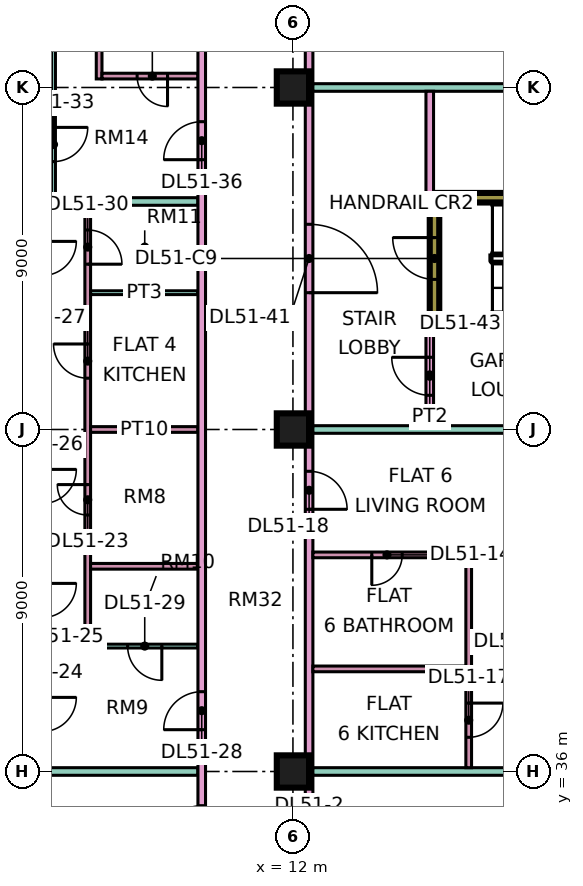
"""IFC4 building model, lengths in metres.
Left out: names, types, materials, properties, quantities, classifications, styles, units other than length and angle.
Written with IfcOpenShell. Run it as: python <this file> out.ifc"""

import sys

from ifc_helpers import new_model, si_unit, direction, frame, frame_2d, origin, origin_2d, place, context, subcontext, project, spatial, rectangle, extrude, element, fill, save


model = new_model("IFC4")
c1 = context("Model", 3, precision=1e-05, world=origin(), true_north=direction((0.0, 1.0)))
c2 = subcontext(c1, "Body", "Model", "MODEL_VIEW")
j1 = project(units=[si_unit("LENGTHUNIT", "METRE"), si_unit("PLANEANGLEUNIT", "RADIAN")], contexts=[c1])
p1 = place(None, origin())
s1 = spatial("IfcSite", under=j1, at=p1, CompositionType="ELEMENT")
p2 = place(p1, origin())
s2 = spatial("IfcBuilding", under=s1, at=p2, CompositionType="ELEMENT")
p3 = place(p2, frame((0.0, 0.0, 219.15)))
s3 = spatial("IfcBuildingStorey", under=s2, at=p3, CompositionType="ELEMENT", Elevation=219.15)
for number, where, z_axis, x_axis in (
    (1, (12.0, 36.0, 0.0), (0.0, 0.0, 1.0), (1.0, 0.0, 0.0)),
    (2, (12.0, 45.0, 0.0), (0.0, 0.0, 1.0), (1.0, 0.0, 0.0)),
    (3, (12.0, 54.0, 0.0), (0.0, 0.0, 1.0), (1.0, 0.0, 0.0)),
):
    element("IfcColumn", number, at=place(p3, frame(where, z_axis=z_axis, x_axis=x_axis)), inside=s3, PredefinedType="COLUMN", context=c2, shape_type="SweptSolid", body=[
        extrude(rectangle(XDim=0.85, YDim=0.85, at=origin_2d()), origin(), (0.0, 0.0, 1.0), 3.75),
    ])
for number, where, z_axis, x_axis in (
    (4, (15.6, 47.9, 0.0), (0.0, 0.0, 1.0), (1.0, 0.0, 0.0)),
    (5, (15.6, 51.1, 0.0), (0.0, 0.0, 1.0), (1.0, 0.0, 0.0)),
):
    element("IfcWall", number, at=place(p3, frame(where, z_axis=z_axis, x_axis=x_axis)), inside=s3, PredefinedType="SHEAR", context=c2, shape_type="SweptSolid", body=[
        extrude(rectangle(XDim=7.0, YDim=0.25, at=frame_2d((3.5, 0.0))), origin(), (0.0, 0.0, 1.0), 3.75),
    ])
p4 = place(p3, frame((15.725, 48.025, 0.0), z_axis=(0.0, 0.0, 1.0), x_axis=(0.0, 1.0, 0.0)))
e6 = element("IfcWall", 6, at=p4, inside=s3, PredefinedType="SHEAR", context=c2, shape_type="SweptSolid", body=[
    extrude(rectangle(XDim=2.95, YDim=0.25, at=frame_2d((1.475, 0.0))), origin(), (0.0, 0.0, 1.0), 3.75),
])
p5 = place(p4, frame((0.925, 0.0, 0.0)))
e7 = element("IfcOpeningElement", 7, at=p5, cuts=e6, PredefinedType="OPENING", context=c2, shape_type="SweptSolid", body=[
    extrude(rectangle(XDim=1.1, YDim=2.2, at=frame_2d((0.55, 1.1))), frame((0.0, 0.135, 0.0), z_axis=(0.0, -1.0, 0.0), x_axis=(1.0, 0.0, 0.0)), (0.0, 0.0, 1.0), 0.27),
])
p6 = place(p3, frame((0.0, 36.0, 0.0), z_axis=(0.0, 0.0, 1.0), x_axis=(1.0, 0.0, 0.0)))
e8 = element("IfcWall", 8, at=p6, inside=s3, PredefinedType="PARTITIONING", context=c2, shape_type="SweptSolid", body=[
    extrude(rectangle(XDim=9.5, YDim=0.2, at=frame_2d((4.75, 0.0))), origin(), (0.0, 0.0, 1.0), 3.35),
])
p7 = place(p3, frame((5.65, 51.0, 0.0), z_axis=(0.0, 0.0, 1.0), x_axis=(1.0, 0.0, 0.0)))
e9 = element("IfcWall", 9, at=p7, inside=s3, PredefinedType="PARTITIONING", context=c2, shape_type="SweptSolid", body=[
    extrude(rectangle(XDim=3.85, YDim=0.2, at=frame_2d((1.925, 0.0))), origin(), (0.0, 0.0, 1.0), 3.35),
])
p8 = place(p3, frame((5.7, 51.1, 0.0), z_axis=(0.0, 0.0, 1.0), x_axis=(0.0, 1.0, 0.0)))
e10 = element("IfcWall", 10, at=p8, inside=s3, PredefinedType="PARTITIONING", context=c2, shape_type="SweptSolid", body=[
    extrude(rectangle(XDim=8.95, YDim=0.1, at=frame_2d((4.475, 0.0))), origin(), (0.0, 0.0, 1.0), 3.35),
])
p9 = place(p8, frame((0.95, 0.0, 0.0)))
e11 = element("IfcOpeningElement", 11, at=p9, cuts=e10, PredefinedType="OPENING", context=c2, shape_type="SweptSolid", body=[
    extrude(rectangle(XDim=0.9, YDim=2.1, at=frame_2d((0.45, 1.05))), frame((0.0, 0.06, 0.0), z_axis=(0.0, -1.0, 0.0), x_axis=(1.0, 0.0, 0.0)), (0.0, 0.0, 1.0), 0.12),
])
p10 = place(p8, frame((3.95, 0.0, 0.0)))
e12 = element("IfcOpeningElement", 12, at=p10, cuts=e10, PredefinedType="OPENING", context=c2, shape_type="SweptSolid", body=[
    extrude(rectangle(XDim=0.9, YDim=2.1, at=frame_2d((0.45, 1.05))), frame((0.0, 0.06, 0.0), z_axis=(0.0, -1.0, 0.0), x_axis=(1.0, 0.0, 0.0)), (0.0, 0.0, 1.0), 0.12),
])
p11 = place(p8, frame((6.95, 0.0, 0.0)))
e13 = element("IfcOpeningElement", 13, at=p11, cuts=e10, PredefinedType="OPENING", context=c2, shape_type="SweptSolid", body=[
    extrude(rectangle(XDim=0.9, YDim=2.1, at=frame_2d((0.45, 1.05))), frame((0.0, 0.06, 0.0), z_axis=(0.0, -1.0, 0.0), x_axis=(1.0, 0.0, 0.0)), (0.0, 0.0, 1.0), 0.12),
])
p12 = place(p3, frame((6.6, 39.25, 0.0), z_axis=(0.0, 0.0, 1.0), x_axis=(0.0, 1.0, 0.0)))
e14 = element("IfcWall", 14, at=p12, inside=s3, PredefinedType="PARTITIONING", context=c2, shape_type="SweptSolid", body=[
    extrude(rectangle(XDim=11.65, YDim=0.15, at=frame_2d((5.825, 0.0))), origin(), (0.0, 0.0, 1.0), 3.35),
])
p13 = place(p12, frame((3.5, 0.0, 0.0)))
e15 = element("IfcOpeningElement", 15, at=p13, cuts=e14, PredefinedType="OPENING", context=c2, shape_type="SweptSolid", body=[
    extrude(rectangle(XDim=0.8, YDim=2.1, at=frame_2d((0.4, 1.05))), frame((0.0, 0.085, 0.0), z_axis=(0.0, -1.0, 0.0), x_axis=(1.0, 0.0, 0.0)), (0.0, 0.0, 1.0), 0.17),
])
p14 = place(p12, frame((7.1, 0.0, 0.0)))
e16 = element("IfcOpeningElement", 16, at=p14, cuts=e14, PredefinedType="OPENING", context=c2, shape_type="SweptSolid", body=[
    extrude(rectangle(XDim=0.9, YDim=2.1, at=frame_2d((0.45, 1.05))), frame((0.0, 0.085, 0.0), z_axis=(0.0, -1.0, 0.0), x_axis=(1.0, 0.0, 0.0)), (0.0, 0.0, 1.0), 0.17),
])
p15 = place(p12, frame((10.1, 0.0, 0.0)))
e17 = element("IfcOpeningElement", 17, at=p15, cuts=e14, PredefinedType="OPENING", context=c2, shape_type="SweptSolid", body=[
    extrude(rectangle(XDim=0.9, YDim=2.1, at=frame_2d((0.45, 1.05))), frame((0.0, 0.085, 0.0), z_axis=(0.0, -1.0, 0.0), x_axis=(1.0, 0.0, 0.0)), (0.0, 0.0, 1.0), 0.17),
])
p16 = place(p3, frame((6.675, 39.3, 0.0), z_axis=(0.0, 0.0, 1.0), x_axis=(1.0, 0.0, 0.0)))
e18 = element("IfcWall", 18, at=p16, inside=s3, PredefinedType="PARTITIONING", context=c2, shape_type="SweptSolid", body=[
    extrude(rectangle(XDim=2.825, YDim=0.1, at=frame_2d((1.413, 0.0))), origin(), (0.0, 0.0, 1.0), 3.35),
])
p17 = place(p16, frame((0.975, 0.0, 0.0)))
e19 = element("IfcOpeningElement", 19, at=p17, cuts=e18, PredefinedType="OPENING", context=c2, shape_type="SweptSolid", body=[
    extrude(rectangle(XDim=0.9, YDim=2.1, at=frame_2d((0.45, 1.05))), frame((0.0, 0.06, 0.0), z_axis=(0.0, -1.0, 0.0), x_axis=(1.0, 0.0, 0.0)), (0.0, 0.0, 1.0), 0.12),
])
for number, where, z_axis, x_axis in (
    (20, (6.675, 41.4, 0.0), (0.0, 0.0, 1.0), (1.0, 0.0, 0.0)),
    (21, (6.675, 45.0, 0.0), (0.0, 0.0, 1.0), (1.0, 0.0, 0.0)),
):
    element("IfcWall", number, at=place(p3, frame(where, z_axis=z_axis, x_axis=x_axis)), inside=s3, PredefinedType="PARTITIONING", context=c2, shape_type="SweptSolid", body=[
        extrude(rectangle(XDim=2.825, YDim=0.15, at=frame_2d((1.413, 0.0))), origin(), (0.0, 0.0, 1.0), 3.35),
    ])
p18 = place(p3, frame((6.675, 48.6, 0.0), z_axis=(0.0, 0.0, 1.0), x_axis=(1.0, 0.0, 0.0)))
e22 = element("IfcWall", 22, at=p18, inside=s3, PredefinedType="PARTITIONING", context=c2, shape_type="SweptSolid", body=[
    extrude(rectangle(XDim=2.825, YDim=0.1, at=frame_2d((1.413, 0.0))), origin(), (0.0, 0.0, 1.0), 3.35),
])
p19 = place(p3, frame((6.9, 54.225, 0.0), z_axis=(0.0, 0.0, 1.0), x_axis=(0.0, 1.0, 0.0)))
e23 = element("IfcWall", 23, at=p19, inside=s3, PredefinedType="PARTITIONING", context=c2, shape_type="SweptSolid", body=[
    extrude(rectangle(XDim=8.701, YDim=0.15, at=frame_2d((4.351, 0.0))), origin(), (0.0, 0.0, 1.0), 3.35),
])
p20 = place(p19, frame((5.025, 0.0, 0.0)))
e24 = element("IfcOpeningElement", 24, at=p20, cuts=e23, PredefinedType="OPENING", context=c2, shape_type="SweptSolid", body=[
    extrude(rectangle(XDim=0.9, YDim=2.1, at=frame_2d((0.45, 1.05))), frame((0.0, 0.085, 0.0), z_axis=(0.0, -1.0, 0.0), x_axis=(1.0, 0.0, 0.0)), (0.0, 0.0, 1.0), 0.17),
])
p21 = place(p3, frame((6.975, 54.3, 0.0), z_axis=(0.0, 0.0, 1.0), x_axis=(1.0, 0.0, 0.0)))
e25 = element("IfcWall", 25, at=p21, inside=s3, PredefinedType="PARTITIONING", context=c2, shape_type="SweptSolid", body=[
    extrude(rectangle(XDim=2.525, YDim=0.15, at=frame_2d((1.262, 0.0))), origin(), (0.0, 0.0, 1.0), 3.35),
])
p22 = place(p21, frame((0.925, 0.0, 0.0)))
e26 = element("IfcOpeningElement", 26, at=p22, cuts=e25, PredefinedType="OPENING", context=c2, shape_type="SweptSolid", body=[
    extrude(rectangle(XDim=0.8, YDim=2.1, at=frame_2d((0.4, 1.05))), frame((0.0, 0.085, 0.0), z_axis=(0.0, -1.0, 0.0), x_axis=(1.0, 0.0, 0.0)), (0.0, 0.0, 1.0), 0.17),
])
p23 = place(p3, frame((9.6, 20.0, 0.0), z_axis=(0.0, 0.0, 1.0), x_axis=(0.0, 1.0, 0.0)))
e27 = element("IfcWall", 27, at=p23, inside=s3, PredefinedType="PARTITIONING", context=c2, shape_type="SweptSolid", body=[
    extrude(rectangle(XDim=42.926, YDim=0.2, at=frame_2d((21.463, 0.0))), origin(), (0.0, 0.0, 1.0), 3.35),
])
p24 = place(p23, frame((17.1, 0.0, 0.0)))
e28 = element("IfcOpeningElement", 28, at=p24, cuts=e27, PredefinedType="OPENING", context=c2, shape_type="SweptSolid", body=[
    extrude(rectangle(XDim=1.0, YDim=2.1, at=frame_2d((0.5, 1.05))), frame((0.0, 0.11, 0.0), z_axis=(0.0, -1.0, 0.0), x_axis=(1.0, 0.0, 0.0)), (0.0, 0.0, 1.0), 0.22),
])
p25 = place(p23, frame((32.1, 0.0, 0.0)))
e29 = element("IfcOpeningElement", 29, at=p25, cuts=e27, PredefinedType="OPENING", context=c2, shape_type="SweptSolid", body=[
    extrude(rectangle(XDim=1.0, YDim=2.1, at=frame_2d((0.5, 1.05))), frame((0.0, 0.11, 0.0), z_axis=(0.0, -1.0, 0.0), x_axis=(1.0, 0.0, 0.0)), (0.0, 0.0, 1.0), 0.22),
])
p26 = place(p23, frame((0.6, 0.0, 0.0)))
e30 = element("IfcOpeningElement", 30, at=p26, cuts=e27, PredefinedType="OPENING", context=c2, shape_type="SweptSolid", body=[
    extrude(rectangle(XDim=1.2, YDim=2.1, at=frame_2d((0.6, 1.05))), frame((0.0, 0.11, 0.0), z_axis=(0.0, -1.0, 0.0), x_axis=(1.0, 0.0, 0.0)), (0.0, 0.0, 1.0), 0.22),
])
p27 = place(p23, frame((14.1, 0.0, 0.0)))
e31 = element("IfcOpeningElement", 31, at=p27, cuts=e27, PredefinedType="OPENING", context=c2, shape_type="SweptSolid", body=[
    extrude(rectangle(XDim=1.0, YDim=2.1, at=frame_2d((0.5, 1.05))), frame((0.0, 0.11, 0.0), z_axis=(0.0, -1.0, 0.0), x_axis=(1.0, 0.0, 0.0)), (0.0, 0.0, 1.0), 0.22),
])
p28 = place(p3, frame((12.425, 20.0, 0.0), z_axis=(0.0, 0.0, 1.0), x_axis=(0.0, 1.0, 0.0)))
e32 = element("IfcWall", 32, at=p28, inside=s3, PredefinedType="PARTITIONING", context=c2, shape_type="SweptSolid", body=[
    extrude(rectangle(XDim=43.0, YDim=0.2, at=frame_2d((21.5, 0.0))), origin(), (0.0, 0.0, 1.0), 3.35),
])
p29 = place(p28, frame((7.15, 0.0, 0.0)))
e33 = element("IfcOpeningElement", 33, at=p29, cuts=e32, PredefinedType="OPENING", context=c2, shape_type="SweptSolid", body=[
    extrude(rectangle(XDim=1.6, YDim=2.1, at=frame_2d((0.8, 1.05))), frame((0.0, 0.11, 0.0), z_axis=(0.0, -1.0, 0.0), x_axis=(1.0, 0.0, 0.0)), (0.0, 0.0, 1.0), 0.22),
])
p30 = place(p28, frame((13.5, 0.0, 0.0)))
e34 = element("IfcOpeningElement", 34, at=p30, cuts=e32, PredefinedType="OPENING", context=c2, shape_type="SweptSolid", body=[
    extrude(rectangle(XDim=1.0, YDim=2.1, at=frame_2d((0.5, 1.05))), frame((0.0, 0.11, 0.0), z_axis=(0.0, -1.0, 0.0), x_axis=(1.0, 0.0, 0.0)), (0.0, 0.0, 1.0), 0.22),
])
p31 = place(p28, frame((22.9, 0.0, 0.0)))
e35 = element("IfcOpeningElement", 35, at=p31, cuts=e32, PredefinedType="OPENING", context=c2, shape_type="SweptSolid", body=[
    extrude(rectangle(XDim=1.0, YDim=2.1, at=frame_2d((0.5, 1.05))), frame((0.0, 0.11, 0.0), z_axis=(0.0, -1.0, 0.0), x_axis=(1.0, 0.0, 0.0)), (0.0, 0.0, 1.0), 0.22),
])
p32 = place(p28, frame((35.35, 0.0, 0.0)))
e36 = element("IfcOpeningElement", 36, at=p32, cuts=e32, PredefinedType="OPENING", context=c2, shape_type="SweptSolid", body=[
    extrude(rectangle(XDim=1.0, YDim=2.1, at=frame_2d((0.5, 1.05))), frame((0.0, 0.11, 0.0), z_axis=(0.0, -1.0, 0.0), x_axis=(1.0, 0.0, 0.0)), (0.0, 0.0, 1.0), 0.22),
])
p33 = place(p28, frame((1.15, 0.0, 0.0)))
e37 = element("IfcOpeningElement", 37, at=p33, cuts=e32, PredefinedType="OPENING", context=c2, shape_type="SweptSolid", body=[
    extrude(rectangle(XDim=1.8, YDim=2.1, at=frame_2d((0.9, 1.05))), frame((0.0, 0.11, 0.0), z_axis=(0.0, -1.0, 0.0), x_axis=(1.0, 0.0, 0.0)), (0.0, 0.0, 1.0), 0.22),
])
p34 = place(p28, frame((28.6, 0.0, 0.0)))
e38 = element("IfcOpeningElement", 38, at=p34, cuts=e32, PredefinedType="OPENING", context=c2, shape_type="SweptSolid", body=[
    extrude(rectangle(XDim=1.8, YDim=2.1, at=frame_2d((0.9, 1.05))), frame((0.0, 0.11, 0.0), z_axis=(0.0, -1.0, 0.0), x_axis=(1.0, 0.0, 0.0)), (0.0, 0.0, 1.0), 0.22),
])
p35 = place(p3, frame((12.525, 36.0, 0.0), z_axis=(0.0, 0.0, 1.0), x_axis=(1.0, 0.0, 0.0)))
e39 = element("IfcWall", 39, at=p35, inside=s3, PredefinedType="PARTITIONING", context=c2, shape_type="SweptSolid", body=[
    extrude(rectangle(XDim=11.475, YDim=0.2, at=frame_2d((5.738, 0.0))), origin(), (0.0, 0.0, 1.0), 3.35),
])
p36 = place(p3, frame((12.525, 38.7, 0.0), z_axis=(0.0, 0.0, 1.0), x_axis=(1.0, 0.0, 0.0)))
e40 = element("IfcWall", 40, at=p36, inside=s3, PredefinedType="PARTITIONING", context=c2, shape_type="SweptSolid", body=[
    extrude(rectangle(XDim=4.025, YDim=0.15, at=frame_2d((2.013, 0.0))), origin(), (0.0, 0.0, 1.0), 3.35),
])
p37 = place(p3, frame((12.525, 41.7, 0.0), z_axis=(0.0, 0.0, 1.0), x_axis=(1.0, 0.0, 0.0)))
e41 = element("IfcWall", 41, at=p37, inside=s3, PredefinedType="PARTITIONING", context=c2, shape_type="SweptSolid", body=[
    extrude(rectangle(XDim=4.025, YDim=0.15, at=frame_2d((2.013, 0.0))), origin(), (0.0, 0.0, 1.0), 3.35),
])
p38 = place(p37, frame((1.55, 0.0, 0.0)))
e42 = element("IfcOpeningElement", 42, at=p38, cuts=e41, PredefinedType="OPENING", context=c2, shape_type="SweptSolid", body=[
    extrude(rectangle(XDim=0.8, YDim=2.1, at=frame_2d((0.4, 1.05))), frame((0.0, 0.085, 0.0), z_axis=(0.0, -1.0, 0.0), x_axis=(1.0, 0.0, 0.0)), (0.0, 0.0, 1.0), 0.17),
])
p39 = place(p3, frame((12.525, 45.0, 0.0), z_axis=(0.0, 0.0, 1.0), x_axis=(1.0, 0.0, 0.0)))
e43 = element("IfcWall", 43, at=p39, inside=s3, PredefinedType="PARTITIONING", context=c2, shape_type="SweptSolid", body=[
    extrude(rectangle(XDim=11.475, YDim=0.2, at=frame_2d((5.738, 0.0))), origin(), (0.0, 0.0, 1.0), 3.35),
])
p40 = place(p3, frame((12.525, 54.0, 0.0), z_axis=(0.0, 0.0, 1.0), x_axis=(1.0, 0.0, 0.0)))
e44 = element("IfcWall", 44, at=p40, inside=s3, PredefinedType="PARTITIONING", context=c2, shape_type="SweptSolid", body=[
    extrude(rectangle(XDim=11.401, YDim=0.2, at=frame_2d((5.701, 0.0))), origin(), (0.0, 0.0, 1.0), 3.35),
])
p41 = place(p3, frame((15.6, 45.1, 0.0), z_axis=(0.0, 0.0, 1.0), x_axis=(0.0, 1.0, 0.0)))
e45 = element("IfcWall", 45, at=p41, inside=s3, PredefinedType="PARTITIONING", context=c2, shape_type="SweptSolid", body=[
    extrude(rectangle(XDim=2.675, YDim=0.2, at=frame_2d((1.337, 0.0))), origin(), (0.0, 0.0, 1.0), 3.35),
])
p42 = place(p41, frame((0.8, 0.0, 0.0)))
e46 = element("IfcOpeningElement", 46, at=p42, cuts=e45, PredefinedType="OPENING", context=c2, shape_type="SweptSolid", body=[
    extrude(rectangle(XDim=1.0, YDim=2.1, at=frame_2d((0.5, 1.05))), frame((0.0, 0.11, 0.0), z_axis=(0.0, -1.0, 0.0), x_axis=(1.0, 0.0, 0.0)), (0.0, 0.0, 1.0), 0.22),
])
p43 = place(p3, frame((15.6, 51.225, 0.0), z_axis=(0.0, 0.0, 1.0), x_axis=(0.0, 1.0, 0.0)))
e47 = element("IfcWall", 47, at=p43, inside=s3, PredefinedType="PARTITIONING", context=c2, shape_type="SweptSolid", body=[
    extrude(rectangle(XDim=2.675, YDim=0.2, at=frame_2d((1.337, 0.0))), origin(), (0.0, 0.0, 1.0), 3.35),
])
p44 = place(p3, frame((16.625, 36.1, 0.0), z_axis=(0.0, 0.0, 1.0), x_axis=(0.0, 1.0, 0.0)))
e48 = element("IfcWall", 48, at=p44, inside=s3, PredefinedType="PARTITIONING", context=c2, shape_type="SweptSolid", body=[
    extrude(rectangle(XDim=5.675, YDim=0.15, at=frame_2d((2.837, 0.0))), origin(), (0.0, 0.0, 1.0), 3.35),
])
p45 = place(p44, frame((0.8, 0.0, 0.0)))
e49 = element("IfcOpeningElement", 49, at=p45, cuts=e48, PredefinedType="OPENING", context=c2, shape_type="SweptSolid", body=[
    extrude(rectangle(XDim=0.9, YDim=2.1, at=frame_2d((0.45, 1.05))), frame((0.0, 0.085, 0.0), z_axis=(0.0, -1.0, 0.0), x_axis=(1.0, 0.0, 0.0)), (0.0, 0.0, 1.0), 0.17),
])
p46 = place(p5, frame((1.1, 0.0, 0.0), z_axis=(0.0, 0.0, 1.0), x_axis=(-1.0, 0.0, 0.0)))
e50 = element("IfcDoor", 50, at=p46, inside=s3, OperationType="SINGLE_SWING_RIGHT", PredefinedType="DOOR", context=c2, shape_type="SweptSolid", body=[
    extrude(rectangle(XDim=1.1, YDim=2.2, at=frame_2d((0.55, 1.1))), frame((0.0, 0.025, 0.0), z_axis=(0.0, -1.0, 0.0), x_axis=(1.0, 0.0, 0.0)), (0.0, 0.0, 1.0), 0.05),
])
fill(e7, e50)
p47 = place(p38, frame((0.8, 0.0, 0.0), z_axis=(0.0, 0.0, 1.0), x_axis=(-1.0, 0.0, 0.0)))
e51 = element("IfcDoor", 51, at=p47, inside=s3, OperationType="SINGLE_SWING_LEFT", PredefinedType="DOOR", context=c2, shape_type="SweptSolid", body=[
    extrude(rectangle(XDim=0.8, YDim=2.1, at=frame_2d((0.4, 1.05))), frame((0.0, 0.025, 0.0), z_axis=(0.0, -1.0, 0.0), x_axis=(1.0, 0.0, 0.0)), (0.0, 0.0, 1.0), 0.05),
])
fill(e42, e51)
p48 = place(p45, origin())
e52 = element("IfcDoor", 52, at=p48, inside=s3, OperationType="SINGLE_SWING_RIGHT", PredefinedType="DOOR", context=c2, shape_type="SweptSolid", body=[
    extrude(rectangle(XDim=0.9, YDim=2.1, at=frame_2d((0.45, 1.05))), frame((0.0, 0.025, 0.0), z_axis=(0.0, -1.0, 0.0), x_axis=(1.0, 0.0, 0.0)), (0.0, 0.0, 1.0), 0.05),
])
fill(e49, e52)
p49 = place(p31, frame((1.0, 0.0, 0.0), z_axis=(0.0, 0.0, 1.0), x_axis=(-1.0, 0.0, 0.0)))
e53 = element("IfcDoor", 53, at=p49, inside=s3, OperationType="SINGLE_SWING_LEFT", PredefinedType="DOOR", context=c2, shape_type="SweptSolid", body=[
    extrude(rectangle(XDim=1.0, YDim=2.1, at=frame_2d((0.5, 1.05))), frame((0.0, 0.025, 0.0), z_axis=(0.0, -1.0, 0.0), x_axis=(1.0, 0.0, 0.0)), (0.0, 0.0, 1.0), 0.05),
])
fill(e35, e53)
p50 = place(p13, frame((0.8, 0.0, 0.0), z_axis=(0.0, 0.0, 1.0), x_axis=(-1.0, 0.0, 0.0)))
e54 = element("IfcDoor", 54, at=p50, inside=s3, OperationType="SINGLE_SWING_RIGHT", PredefinedType="DOOR", context=c2, shape_type="SweptSolid", body=[
    extrude(rectangle(XDim=0.8, YDim=2.1, at=frame_2d((0.4, 1.05))), frame((0.0, 0.025, 0.0), z_axis=(0.0, -1.0, 0.0), x_axis=(1.0, 0.0, 0.0)), (0.0, 0.0, 1.0), 0.05),
])
fill(e15, e54)
p51 = place(p14, frame((0.9, 0.0, 0.0), z_axis=(0.0, 0.0, 1.0), x_axis=(-1.0, 0.0, 0.0)))
e55 = element("IfcDoor", 55, at=p51, inside=s3, OperationType="SINGLE_SWING_RIGHT", PredefinedType="DOOR", context=c2, shape_type="SweptSolid", body=[
    extrude(rectangle(XDim=0.9, YDim=2.1, at=frame_2d((0.45, 1.05))), frame((0.0, 0.025, 0.0), z_axis=(0.0, -1.0, 0.0), x_axis=(1.0, 0.0, 0.0)), (0.0, 0.0, 1.0), 0.05),
])
fill(e16, e55)
p52 = place(p24, origin())
e56 = element("IfcDoor", 56, at=p52, inside=s3, OperationType="SINGLE_SWING_LEFT", PredefinedType="DOOR", context=c2, shape_type="SweptSolid", body=[
    extrude(rectangle(XDim=1.0, YDim=2.1, at=frame_2d((0.5, 1.05))), frame((0.0, 0.025, 0.0), z_axis=(0.0, -1.0, 0.0), x_axis=(1.0, 0.0, 0.0)), (0.0, 0.0, 1.0), 0.05),
])
fill(e28, e56)
p53 = place(p17, origin())
e57 = element("IfcDoor", 57, at=p53, inside=s3, OperationType="SINGLE_SWING_RIGHT", PredefinedType="DOOR", context=c2, shape_type="SweptSolid", body=[
    extrude(rectangle(XDim=0.9, YDim=2.1, at=frame_2d((0.45, 1.05))), frame((0.0, 0.025, 0.0), z_axis=(0.0, -1.0, 0.0), x_axis=(1.0, 0.0, 0.0)), (0.0, 0.0, 1.0), 0.05),
])
fill(e19, e57)
p54 = place(p15, frame((0.9, 0.0, 0.0), z_axis=(0.0, 0.0, 1.0), x_axis=(-1.0, 0.0, 0.0)))
e58 = element("IfcDoor", 58, at=p54, inside=s3, OperationType="SINGLE_SWING_LEFT", PredefinedType="DOOR", context=c2, shape_type="SweptSolid", body=[
    extrude(rectangle(XDim=0.9, YDim=2.1, at=frame_2d((0.45, 1.05))), frame((0.0, 0.025, 0.0), z_axis=(0.0, -1.0, 0.0), x_axis=(1.0, 0.0, 0.0)), (0.0, 0.0, 1.0), 0.05),
])
fill(e17, e58)
p55 = place(p22, origin())
e59 = element("IfcDoor", 59, at=p55, inside=s3, OperationType="SINGLE_SWING_RIGHT", PredefinedType="DOOR", context=c2, shape_type="SweptSolid", body=[
    extrude(rectangle(XDim=0.8, YDim=2.1, at=frame_2d((0.4, 1.05))), frame((0.0, 0.025, 0.0), z_axis=(0.0, -1.0, 0.0), x_axis=(1.0, 0.0, 0.0)), (0.0, 0.0, 1.0), 0.05),
])
fill(e26, e59)
p56 = place(p9, origin())
e60 = element("IfcDoor", 60, at=p56, inside=s3, OperationType="SINGLE_SWING_RIGHT", PredefinedType="DOOR", context=c2, shape_type="SweptSolid", body=[
    extrude(rectangle(XDim=0.9, YDim=2.1, at=frame_2d((0.45, 1.05))), frame((0.0, 0.025, 0.0), z_axis=(0.0, -1.0, 0.0), x_axis=(1.0, 0.0, 0.0)), (0.0, 0.0, 1.0), 0.05),
])
fill(e11, e60)
p57 = place(p25, origin())
e61 = element("IfcDoor", 61, at=p57, inside=s3, OperationType="SINGLE_SWING_LEFT", PredefinedType="DOOR", context=c2, shape_type="SweptSolid", body=[
    extrude(rectangle(XDim=1.0, YDim=2.1, at=frame_2d((0.5, 1.05))), frame((0.0, 0.025, 0.0), z_axis=(0.0, -1.0, 0.0), x_axis=(1.0, 0.0, 0.0)), (0.0, 0.0, 1.0), 0.05),
])
fill(e29, e61)
p58 = place(p34, frame((1.8, 0.0, 0.0), z_axis=(0.0, 0.0, 1.0), x_axis=(-1.0, 0.0, 0.0)))
e62 = element("IfcDoor", 62, at=p58, inside=s3, OperationType="DOUBLE_DOOR_SINGLE_SWING", PredefinedType="DOOR", context=c2, shape_type="SweptSolid", body=[
    extrude(rectangle(XDim=1.8, YDim=2.1, at=frame_2d((0.9, 1.05))), frame((0.0, 0.025, 0.0), z_axis=(0.0, -1.0, 0.0), x_axis=(1.0, 0.0, 0.0)), (0.0, 0.0, 1.0), 0.05),
])
fill(e38, e62)
p59 = place(p42, frame((1.0, 0.0, 0.0), z_axis=(0.0, 0.0, 1.0), x_axis=(-1.0, 0.0, 0.0)))
e63 = element("IfcDoor", 63, at=p59, inside=s3, OperationType="SINGLE_SWING_RIGHT", PredefinedType="DOOR", context=c2, shape_type="SweptSolid", body=[
    extrude(rectangle(XDim=1.0, YDim=2.1, at=frame_2d((0.5, 1.05))), frame((0.0, 0.025, 0.0), z_axis=(0.0, -1.0, 0.0), x_axis=(1.0, 0.0, 0.0)), (0.0, 0.0, 1.0), 0.05),
])
fill(e46, e63)
p60 = place(p27, origin())
e64 = element("IfcDoor", 64, at=p60, inside=s3, OperationType="SINGLE_SWING_LEFT", PredefinedType="DOOR", context=c2, shape_type="SweptSolid", body=[
    extrude(rectangle(XDim=1.0, YDim=2.1, at=frame_2d((0.5, 1.05))), frame((0.0, 0.025, 0.0), z_axis=(0.0, -1.0, 0.0), x_axis=(1.0, 0.0, 0.0)), (0.0, 0.0, 1.0), 0.05),
])
fill(e31, e64)
save(model, sys.argv[1])
